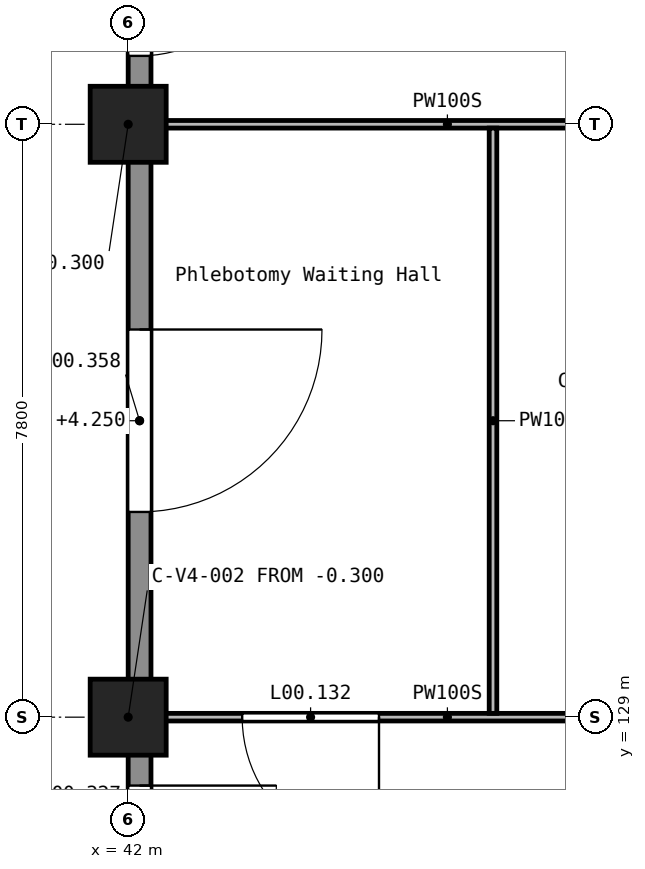
"""IFC4 building model, lengths in metres.
Left out: names, types, materials, properties, quantities, classifications, styles, units other than length and angle.
Written with IfcOpenShell. Run it as: python <this file> out.ifc"""

import sys

from ifc_helpers import new_model, si_unit, direction, frame, frame_2d, origin, origin_2d, place, context, subcontext, project, spatial, rectangle, extrude, element, fill, save


model = new_model("IFC4")
c1 = context("Model", 3, precision=1e-05, world=origin(), true_north=direction((0.0, 1.0)))
c2 = subcontext(c1, "Body", "Model", "MODEL_VIEW")
j1 = project(units=[si_unit("LENGTHUNIT", "METRE"), si_unit("PLANEANGLEUNIT", "RADIAN")], contexts=[c1])
p1 = place(None, origin())
s1 = spatial("IfcSite", under=j1, at=p1, CompositionType="ELEMENT")
p2 = place(p1, origin())
s2 = spatial("IfcBuilding", under=s1, at=p2, CompositionType="ELEMENT")
p3 = place(p2, origin())
s3 = spatial("IfcBuildingStorey", under=s2, at=p3, CompositionType="ELEMENT", Elevation=0.0)
for number, where, z_axis, x_axis in (
    (1, (42.0, 129.0, -0.3), (0.0, 0.0, 1.0), (1.0, 0.0, 0.0)),
    (2, (42.0, 136.8, -0.3), (0.0, 0.0, 1.0), (1.0, 0.0, 0.0)),
):
    element("IfcColumn", number, at=place(p3, frame(where, z_axis=z_axis, x_axis=x_axis)), inside=s3, PredefinedType="COLUMN", context=c2, shape_type="SweptSolid", body=[
        extrude(rectangle(XDim=1.0, YDim=1.0, at=origin_2d()), origin(), (0.0, 0.0, 1.0), 5.7),
    ])
p4 = place(p3, frame((42.15, 139.9, 0.0), z_axis=(0.0, 0.0, 1.0), x_axis=(0.0, -1.0, 0.0)))
e3 = element("IfcWall", 3, at=p4, inside=s3, PredefinedType="STANDARD", context=c2, shape_type="SweptSolid", body=[
    extrude(rectangle(XDim=2.65, YDim=0.3, at=frame_2d((1.325, 0.0))), origin(), (0.0, 0.0, 1.0), 4.25),
])
p5 = place(p4, frame((0.4, 0.0, 0.0)))
e4 = element("IfcOpeningElement", 4, at=p5, cuts=e3, PredefinedType="OPENING", context=c2, shape_type="SweptSolid", body=[
    extrude(rectangle(XDim=1.8, YDim=2.1, at=frame_2d((0.9, 1.05))), frame((0.0, 0.16, 0.0), z_axis=(0.0, -1.0, 0.0), x_axis=(1.0, 0.0, 0.0)), (0.0, 0.0, 1.0), 0.32),
])
p6 = place(p3, frame((42.15, 136.35, 0.0), z_axis=(0.0, 0.0, 1.0), x_axis=(0.0, -1.0, 0.0)))
e5 = element("IfcWall", 5, at=p6, inside=s3, PredefinedType="STANDARD", context=c2, shape_type="SweptSolid", body=[
    extrude(rectangle(XDim=6.9, YDim=0.3, at=frame_2d((3.45, 0.0))), origin(), (0.0, 0.0, 1.0), 4.25),
])
p7 = place(p6, frame((2.25, 0.0, 0.0)))
e6 = element("IfcOpeningElement", 6, at=p7, cuts=e5, PredefinedType="OPENING", context=c2, shape_type="SweptSolid", body=[
    extrude(rectangle(XDim=2.4, YDim=2.4, at=frame_2d((1.2, 1.2))), frame((0.0, 0.16, 0.0), z_axis=(0.0, -1.0, 0.0), x_axis=(1.0, 0.0, 0.0)), (0.0, 0.0, 1.0), 0.32),
])
p8 = place(p3, frame((42.15, 128.55, 0.0), z_axis=(0.0, 0.0, 1.0), x_axis=(0.0, -1.0, 0.0)))
e7 = element("IfcWall", 7, at=p8, inside=s3, PredefinedType="STANDARD", context=c2, shape_type="SweptSolid", body=[
    extrude(rectangle(XDim=2.7, YDim=0.3, at=frame_2d((1.35, 0.0))), origin(), (0.0, 0.0, 1.0), 4.25),
])
p9 = place(p8, frame((0.45, 0.0, 0.0)))
e8 = element("IfcOpeningElement", 8, at=p9, cuts=e7, PredefinedType="OPENING", context=c2, shape_type="SweptSolid", body=[
    extrude(rectangle(XDim=1.8, YDim=2.1, at=frame_2d((0.9, 1.05))), frame((0.0, 0.16, 0.0), z_axis=(0.0, -1.0, 0.0), x_axis=(1.0, 0.0, 0.0)), (0.0, 0.0, 1.0), 0.32),
])
p10 = place(p3, frame((49.95, 129.0, 0.0), z_axis=(0.0, 0.0, 1.0), x_axis=(-1.0, 0.0, 0.0)))
e9 = element("IfcWall", 9, at=p10, inside=s3, PredefinedType="PARTITIONING", context=c2, shape_type="SweptSolid", body=[
    extrude(rectangle(XDim=7.5, YDim=0.1, at=frame_2d((3.75, 0.0))), origin(), (0.0, 0.0, 1.0), 5.05),
])
p11 = place(p10, frame((4.65, 0.0, 0.0)))
e10 = element("IfcOpeningElement", 10, at=p11, cuts=e9, PredefinedType="OPENING", context=c2, shape_type="SweptSolid", body=[
    extrude(rectangle(XDim=1.8, YDim=2.1, at=frame_2d((0.9, 1.05))), frame((0.0, 0.06, 0.0), z_axis=(0.0, -1.0, 0.0), x_axis=(1.0, 0.0, 0.0)), (0.0, 0.0, 1.0), 0.12),
])
p12 = place(p10, frame((0.85, 0.0, 0.0)))
e11 = element("IfcOpeningElement", 11, at=p12, cuts=e9, PredefinedType="OPENING", context=c2, shape_type="SweptSolid", body=[
    extrude(rectangle(XDim=1.0, YDim=2.1, at=frame_2d((0.5, 1.05))), frame((0.0, 0.06, 0.0), z_axis=(0.0, -1.0, 0.0), x_axis=(1.0, 0.0, 0.0)), (0.0, 0.0, 1.0), 0.12),
])
p13 = place(p3, frame((49.95, 136.8, 0.0), z_axis=(0.0, 0.0, 1.0), x_axis=(-1.0, 0.0, 0.0)))
e12 = element("IfcWall", 12, at=p13, inside=s3, PredefinedType="PARTITIONING", context=c2, shape_type="SweptSolid", body=[
    extrude(rectangle(XDim=7.5, YDim=0.1, at=frame_2d((3.75, 0.0))), origin(), (0.0, 0.0, 1.0), 5.05),
])
p14 = place(p3, frame((46.8, 129.05, 0.0), z_axis=(0.0, 0.0, 1.0), x_axis=(0.0, 1.0, 0.0)))
e13 = element("IfcWall", 13, at=p14, inside=s3, PredefinedType="PARTITIONING", context=c2, shape_type="SweptSolid", body=[
    extrude(rectangle(XDim=7.7, YDim=0.1, at=frame_2d((3.85, 0.0))), origin(), (0.0, 0.0, 1.0), 5.05),
])
p15 = place(p7, frame((2.4, 0.0, 0.0), z_axis=(0.0, 0.0, 1.0), x_axis=(-1.0, 0.0, 0.0)))
e14 = element("IfcDoor", 14, at=p15, inside=s3, OperationType="SINGLE_SWING_LEFT", PredefinedType="DOOR", context=c2, shape_type="SweptSolid", body=[
    extrude(rectangle(XDim=2.4, YDim=2.4, at=frame_2d((1.2, 1.2))), frame((0.0, 0.025, 0.0), z_axis=(0.0, -1.0, 0.0), x_axis=(1.0, 0.0, 0.0)), (0.0, 0.0, 1.0), 0.05),
])
fill(e6, e14)
p16 = place(p9, frame((1.8, 0.0, 0.0), z_axis=(0.0, 0.0, 1.0), x_axis=(-1.0, 0.0, 0.0)))
e15 = element("IfcDoor", 15, at=p16, inside=s3, OperationType="SINGLE_SWING_LEFT", PredefinedType="DOOR", context=c2, shape_type="SweptSolid", body=[
    extrude(rectangle(XDim=1.8, YDim=2.1, at=frame_2d((0.9, 1.05))), frame((0.0, 0.025, 0.0), z_axis=(0.0, -1.0, 0.0), x_axis=(1.0, 0.0, 0.0)), (0.0, 0.0, 1.0), 0.05),
])
fill(e8, e15)
p17 = place(p5, frame((1.8, 0.0, 0.0), z_axis=(0.0, 0.0, 1.0), x_axis=(-1.0, 0.0, 0.0)))
e16 = element("IfcDoor", 16, at=p17, inside=s3, OperationType="SINGLE_SWING_LEFT", PredefinedType="DOOR", context=c2, shape_type="SweptSolid", body=[
    extrude(rectangle(XDim=1.8, YDim=2.1, at=frame_2d((0.9, 1.05))), frame((0.0, 0.025, 0.0), z_axis=(0.0, -1.0, 0.0), x_axis=(1.0, 0.0, 0.0)), (0.0, 0.0, 1.0), 0.05),
])
fill(e4, e16)
p18 = place(p11, frame((1.8, 0.0, 0.0), z_axis=(0.0, 0.0, 1.0), x_axis=(-1.0, 0.0, 0.0)))
e17 = element("IfcDoor", 17, at=p18, inside=s3, OperationType="DOUBLE_DOOR_SINGLE_SWING", PredefinedType="DOOR", context=c2, shape_type="SweptSolid", body=[
    extrude(rectangle(XDim=1.8, YDim=2.1, at=frame_2d((0.9, 1.05))), frame((0.0, 0.025, 0.0), z_axis=(0.0, -1.0, 0.0), x_axis=(1.0, 0.0, 0.0)), (0.0, 0.0, 1.0), 0.05),
])
fill(e10, e17)
save(model, sys.argv[1])
